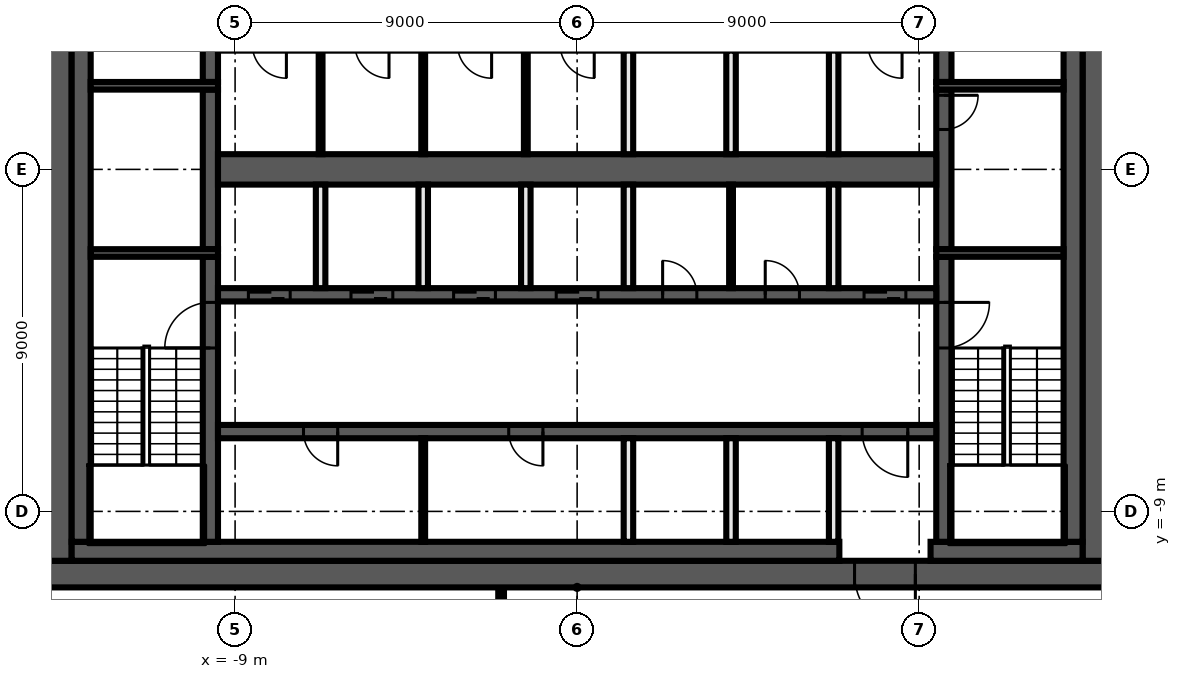
"""IFC4 building model, lengths in metres.
Left out: names, types, materials, properties, quantities, classifications, styles, units other than length and angle.
Written with IfcOpenShell. Run it as: python <this file> out.ifc"""

import sys

from ifc_helpers import new_model, si_unit, direction, frame, frame_2d, origin, place, context, subcontext, project, spatial, rectangle, extrude, element, fill, save


model = new_model("IFC4")
c1 = context("Model", 3, precision=1e-05, world=origin(), true_north=direction((0.0, 1.0)))
c2 = subcontext(c1, "Body", "Model", "MODEL_VIEW")
j1 = project(units=[si_unit("LENGTHUNIT", "METRE"), si_unit("PLANEANGLEUNIT", "RADIAN")], contexts=[c1])
p1 = place(None, origin())
s1 = spatial("IfcSite", under=j1, at=p1, CompositionType="ELEMENT")
p2 = place(p1, origin())
s2 = spatial("IfcBuilding", under=s1, at=p2, CompositionType="ELEMENT")
p3 = place(p2, frame((0.0, 0.0, 228.6)))
s3 = spatial("IfcBuildingStorey", under=s2, at=p3, CompositionType="ELEMENT", Elevation=228.6)
p4 = place(p3, frame((-2.0, -13.325, 0.0), z_axis=(0.0, 0.0, 1.0), x_axis=(0.0, 1.0, 0.0)))
e1 = element("IfcWall", 1, at=p4, inside=s3, PredefinedType="PARTITIONING", context=c2, shape_type="SweptSolid", body=[
    extrude(rectangle(XDim=2.325, YDim=0.15, at=frame_2d((1.163, 0.0))), origin(), (0.0, 0.0, 1.0), 3.75),
])
p5 = place(p3, frame((14.0, -10.65, 0.0), z_axis=(0.0, 0.0, 1.0), x_axis=(-1.0, 0.0, 0.0)))
e2 = element("IfcWall", 2, at=p5, inside=s3, PredefinedType="SHEAR", context=c2, shape_type="SweptSolid", body=[
    extrude(rectangle(XDim=28.0, YDim=0.7, at=frame_2d((14.0, 0.0))), origin(), (0.0, 0.0, 1.0), 3.75),
])
p6 = place(p5, frame((5.1, 0.0, 0.0)))
e3 = element("IfcOpeningElement", 3, at=p6, cuts=e2, PredefinedType="OPENING", context=c2, shape_type="SweptSolid", body=[
    extrude(rectangle(XDim=1.6, YDim=2.1, at=frame_2d((0.8, 1.05))), frame((0.0, 0.36, 0.0), z_axis=(0.0, -1.0, 0.0), x_axis=(1.0, 0.0, 0.0)), (0.0, 0.0, 1.0), 0.72),
])
for number, where, z_axis, x_axis in (
    (4, (13.65, 10.3, 0.0), (0.0, 0.0, 1.0), (0.0, -1.0, 0.0)),
    (5, (-13.65, -10.3, 0.0), (0.0, 0.0, 1.0), (0.0, 1.0, 0.0)),
):
    element("IfcWall", number, at=place(p3, frame(where, z_axis=z_axis, x_axis=x_axis)), inside=s3, PredefinedType="SHEAR", context=c2, shape_type="SweptSolid", body=[
        extrude(rectangle(XDim=20.6, YDim=0.7, at=frame_2d((10.3, 0.0))), origin(), (0.0, 0.0, 1.0), 3.75),
    ])
p7 = place(p3, frame((13.3, -10.05, 0.0), z_axis=(0.0, 0.0, 1.0), x_axis=(-1.0, 0.0, 0.0)))
e6 = element("IfcWall", 6, at=p7, inside=s3, PredefinedType="SHEAR", context=c2, shape_type="SweptSolid", body=[
    extrude(rectangle(XDim=4.0, YDim=0.5, at=frame_2d((2.0, 0.0))), origin(), (0.0, 0.0, 1.0), 3.75),
])
p8 = place(p3, frame((6.9, -10.05, 0.0), z_axis=(0.0, 0.0, 1.0), x_axis=(-1.0, 0.0, 0.0)))
e7 = element("IfcWall", 7, at=p8, inside=s3, PredefinedType="SHEAR", context=c2, shape_type="SweptSolid", body=[
    extrude(rectangle(XDim=20.2, YDim=0.5, at=frame_2d((10.1, 0.0))), origin(), (0.0, 0.0, 1.0), 3.75),
])
for number, where, z_axis, x_axis in (
    (8, (13.05, 9.8, 0.0), (0.0, 0.0, 1.0), (0.0, -1.0, 0.0)),
    (9, (-13.05, -9.8, 0.0), (0.0, 0.0, 1.0), (0.0, 1.0, 0.0)),
):
    element("IfcWall", number, at=place(p3, frame(where, z_axis=z_axis, x_axis=x_axis)), inside=s3, PredefinedType="SHEAR", context=c2, shape_type="SweptSolid", body=[
        extrude(rectangle(XDim=19.6, YDim=0.5, at=frame_2d((9.8, 0.0))), origin(), (0.0, 0.0, 1.0), 3.75),
    ])
p9 = place(p3, frame((9.65, -2.3, 0.0), z_axis=(0.0, 0.0, 1.0), x_axis=(0.0, -1.0, 0.0)))
e10 = element("IfcWall", 10, at=p9, inside=s3, PredefinedType="SHEAR", context=c2, shape_type="SweptSolid", body=[
    extrude(rectangle(XDim=7.5, YDim=0.4, at=frame_2d((3.75, 0.0))), origin(), (0.0, 0.0, 1.0), 3.75),
])
p10 = place(p9, frame((1.2, 0.0, 0.0)))
e11 = element("IfcOpeningElement", 11, at=p10, cuts=e10, PredefinedType="OPENING", context=c2, shape_type="SweptSolid", body=[
    extrude(rectangle(XDim=1.2, YDim=2.1, at=frame_2d((0.6, 1.05))), frame((0.0, 0.21, 0.0), z_axis=(0.0, -1.0, 0.0), x_axis=(1.0, 0.0, 0.0)), (0.0, 0.0, 1.0), 0.42),
])
p11 = place(p3, frame((9.65, 2.1, 0.0), z_axis=(0.0, 0.0, 1.0), x_axis=(0.0, -1.0, 0.0)))
e12 = element("IfcWall", 12, at=p11, inside=s3, PredefinedType="SHEAR", context=c2, shape_type="SweptSolid", body=[
    extrude(rectangle(XDim=4.2, YDim=0.4, at=frame_2d((2.1, 0.0))), origin(), (0.0, 0.0, 1.0), 3.75),
])
p12 = place(p11, frame((0.15, 0.0, 0.0)))
e13 = element("IfcOpeningElement", 13, at=p12, cuts=e12, PredefinedType="OPENING", context=c2, shape_type="SweptSolid", body=[
    extrude(rectangle(XDim=0.9, YDim=2.1, at=frame_2d((0.45, 1.05))), frame((0.0, 0.21, 0.0), z_axis=(0.0, -1.0, 0.0), x_axis=(1.0, 0.0, 0.0)), (0.0, 0.0, 1.0), 0.42),
])
p13 = place(p3, frame((9.65, 9.8, 0.0), z_axis=(0.0, 0.0, 1.0), x_axis=(0.0, -1.0, 0.0)))
e14 = element("IfcWall", 14, at=p13, inside=s3, PredefinedType="SHEAR", context=c2, shape_type="SweptSolid", body=[
    extrude(rectangle(XDim=7.5, YDim=0.4, at=frame_2d((3.75, 0.0))), origin(), (0.0, 0.0, 1.0), 3.75),
])
p14 = place(p13, frame((5.1, 0.0, 0.0)))
e15 = element("IfcOpeningElement", 15, at=p14, cuts=e14, PredefinedType="OPENING", context=c2, shape_type="SweptSolid", body=[
    extrude(rectangle(XDim=1.2, YDim=2.1, at=frame_2d((0.6, 1.05))), frame((0.0, 0.21, 0.0), z_axis=(0.0, -1.0, 0.0), x_axis=(1.0, 0.0, 0.0)), (0.0, 0.0, 1.0), 0.42),
])
p15 = place(p3, frame((-9.65, -9.8, 0.0), z_axis=(0.0, 0.0, 1.0), x_axis=(0.0, 1.0, 0.0)))
e16 = element("IfcWall", 16, at=p15, inside=s3, PredefinedType="SHEAR", context=c2, shape_type="SweptSolid", body=[
    extrude(rectangle(XDim=7.5, YDim=0.4, at=frame_2d((3.75, 0.0))), origin(), (0.0, 0.0, 1.0), 3.75),
])
p16 = place(p15, frame((5.1, 0.0, 0.0)))
e17 = element("IfcOpeningElement", 17, at=p16, cuts=e16, PredefinedType="OPENING", context=c2, shape_type="SweptSolid", body=[
    extrude(rectangle(XDim=1.2, YDim=2.1, at=frame_2d((0.6, 1.05))), frame((0.0, 0.21, 0.0), z_axis=(0.0, -1.0, 0.0), x_axis=(1.0, 0.0, 0.0)), (0.0, 0.0, 1.0), 0.42),
])
p17 = place(p3, frame((-9.65, -2.1, 0.0), z_axis=(0.0, 0.0, 1.0), x_axis=(0.0, 1.0, 0.0)))
e18 = element("IfcWall", 18, at=p17, inside=s3, PredefinedType="SHEAR", context=c2, shape_type="SweptSolid", body=[
    extrude(rectangle(XDim=4.2, YDim=0.4, at=frame_2d((2.1, 0.0))), origin(), (0.0, 0.0, 1.0), 3.75),
])
p18 = place(p3, frame((-9.65, 2.3, 0.0), z_axis=(0.0, 0.0, 1.0), x_axis=(0.0, 1.0, 0.0)))
e19 = element("IfcWall", 19, at=p18, inside=s3, PredefinedType="SHEAR", context=c2, shape_type="SweptSolid", body=[
    extrude(rectangle(XDim=7.5, YDim=0.4, at=frame_2d((3.75, 0.0))), origin(), (0.0, 0.0, 1.0), 3.75),
])
p19 = place(p18, frame((1.2, 0.0, 0.0)))
e20 = element("IfcOpeningElement", 20, at=p19, cuts=e19, PredefinedType="OPENING", context=c2, shape_type="SweptSolid", body=[
    extrude(rectangle(XDim=1.2, YDim=2.1, at=frame_2d((0.6, 1.05))), frame((0.0, 0.21, 0.0), z_axis=(0.0, -1.0, 0.0), x_axis=(1.0, 0.0, 0.0)), (0.0, 0.0, 1.0), 0.42),
])
for number, where, z_axis, x_axis in (
    (21, (9.45, 2.2, 0.0), (0.0, 0.0, 1.0), (1.0, 0.0, 0.0)),
    (22, (-9.45, 2.2, 0.0), (0.0, 0.0, 1.0), (-1.0, 0.0, 0.0)),
    (23, (9.45, -2.2, 0.0), (0.0, 0.0, 1.0), (1.0, 0.0, 0.0)),
    (24, (-9.45, -2.2, 0.0), (0.0, 0.0, 1.0), (-1.0, 0.0, 0.0)),
):
    element("IfcWall", number, at=place(p3, frame(where, z_axis=z_axis, x_axis=x_axis)), inside=s3, PredefinedType="SHEAR", context=c2, shape_type="SweptSolid", body=[
        extrude(rectangle(XDim=3.35, YDim=0.2, at=frame_2d((1.675, 0.0))), origin(), (0.0, 0.0, 1.0), 3.75),
    ])
p20 = place(p3, frame((-9.45, -3.3, 0.0), z_axis=(0.0, 0.0, 1.0), x_axis=(1.0, 0.0, 0.0)))
e25 = element("IfcWall", 25, at=p20, inside=s3, PredefinedType="SHEAR", context=c2, shape_type="SweptSolid", body=[
    extrude(rectangle(XDim=18.9, YDim=0.35, at=frame_2d((9.45, 0.0))), origin(), (0.0, 0.0, 1.0), 3.75),
])
p21 = place(p20, frame((0.8, 0.0, 0.0)))
e26 = element("IfcOpeningElement", 26, at=p21, cuts=e25, PredefinedType="OPENING", context=c2, shape_type="SweptSolid", body=[
    extrude(rectangle(XDim=1.1, YDim=2.1, at=frame_2d((0.55, 1.05))), frame((0.0, 0.185, 0.0), z_axis=(0.0, -1.0, 0.0), x_axis=(1.0, 0.0, 0.0)), (0.0, 0.0, 1.0), 0.37),
])
p22 = place(p20, frame((3.5, 0.0, 0.0)))
e27 = element("IfcOpeningElement", 27, at=p22, cuts=e25, PredefinedType="OPENING", context=c2, shape_type="SweptSolid", body=[
    extrude(rectangle(XDim=1.1, YDim=2.1, at=frame_2d((0.55, 1.05))), frame((0.0, 0.185, 0.0), z_axis=(0.0, -1.0, 0.0), x_axis=(1.0, 0.0, 0.0)), (0.0, 0.0, 1.0), 0.37),
])
p23 = place(p20, frame((6.2, 0.0, 0.0)))
e28 = element("IfcOpeningElement", 28, at=p23, cuts=e25, PredefinedType="OPENING", context=c2, shape_type="SweptSolid", body=[
    extrude(rectangle(XDim=1.1, YDim=2.1, at=frame_2d((0.55, 1.05))), frame((0.0, 0.185, 0.0), z_axis=(0.0, -1.0, 0.0), x_axis=(1.0, 0.0, 0.0)), (0.0, 0.0, 1.0), 0.37),
])
p24 = place(p20, frame((8.9, 0.0, 0.0)))
e29 = element("IfcOpeningElement", 29, at=p24, cuts=e25, PredefinedType="OPENING", context=c2, shape_type="SweptSolid", body=[
    extrude(rectangle(XDim=1.1, YDim=2.1, at=frame_2d((0.55, 1.05))), frame((0.0, 0.185, 0.0), z_axis=(0.0, -1.0, 0.0), x_axis=(1.0, 0.0, 0.0)), (0.0, 0.0, 1.0), 0.37),
])
p25 = place(p20, frame((17.0, 0.0, 0.0)))
e30 = element("IfcOpeningElement", 30, at=p25, cuts=e25, PredefinedType="OPENING", context=c2, shape_type="SweptSolid", body=[
    extrude(rectangle(XDim=1.1, YDim=2.1, at=frame_2d((0.55, 1.05))), frame((0.0, 0.185, 0.0), z_axis=(0.0, -1.0, 0.0), x_axis=(1.0, 0.0, 0.0)), (0.0, 0.0, 1.0), 0.37),
])
p26 = place(p20, frame((11.7, 0.0, 0.0)))
e31 = element("IfcOpeningElement", 31, at=p26, cuts=e25, PredefinedType="OPENING", context=c2, shape_type="SweptSolid", body=[
    extrude(rectangle(XDim=0.9, YDim=2.1, at=frame_2d((0.45, 1.05))), frame((0.0, 0.185, 0.0), z_axis=(0.0, -1.0, 0.0), x_axis=(1.0, 0.0, 0.0)), (0.0, 0.0, 1.0), 0.37),
])
p27 = place(p20, frame((14.4, 0.0, 0.0)))
e32 = element("IfcOpeningElement", 32, at=p27, cuts=e25, PredefinedType="OPENING", context=c2, shape_type="SweptSolid", body=[
    extrude(rectangle(XDim=0.9, YDim=2.1, at=frame_2d((0.45, 1.05))), frame((0.0, 0.185, 0.0), z_axis=(0.0, -1.0, 0.0), x_axis=(1.0, 0.0, 0.0)), (0.0, 0.0, 1.0), 0.37),
])
p28 = place(p3, frame((9.45, -6.9, 0.0), z_axis=(0.0, 0.0, 1.0), x_axis=(-1.0, 0.0, 0.0)))
e33 = element("IfcWall", 33, at=p28, inside=s3, PredefinedType="SHEAR", context=c2, shape_type="SweptSolid", body=[
    extrude(rectangle(XDim=18.9, YDim=0.35, at=frame_2d((9.45, 0.0))), origin(), (0.0, 0.0, 1.0), 3.75),
])
p29 = place(p28, frame((0.75, 0.0, 0.0)))
e34 = element("IfcOpeningElement", 34, at=p29, cuts=e33, PredefinedType="OPENING", context=c2, shape_type="SweptSolid", body=[
    extrude(rectangle(XDim=1.2, YDim=2.1, at=frame_2d((0.6, 1.05))), frame((0.0, 0.185, 0.0), z_axis=(0.0, -1.0, 0.0), x_axis=(1.0, 0.0, 0.0)), (0.0, 0.0, 1.0), 0.37),
])
p30 = place(p28, frame((15.75, 0.0, 0.0)))
e35 = element("IfcOpeningElement", 35, at=p30, cuts=e33, PredefinedType="OPENING", context=c2, shape_type="SweptSolid", body=[
    extrude(rectangle(XDim=0.9, YDim=2.1, at=frame_2d((0.45, 1.05))), frame((0.0, 0.185, 0.0), z_axis=(0.0, -1.0, 0.0), x_axis=(1.0, 0.0, 0.0)), (0.0, 0.0, 1.0), 0.37),
])
p31 = place(p28, frame((10.35, 0.0, 0.0)))
e36 = element("IfcOpeningElement", 36, at=p31, cuts=e33, PredefinedType="OPENING", context=c2, shape_type="SweptSolid", body=[
    extrude(rectangle(XDim=0.9, YDim=2.1, at=frame_2d((0.45, 1.05))), frame((0.0, 0.185, 0.0), z_axis=(0.0, -1.0, 0.0), x_axis=(1.0, 0.0, 0.0)), (0.0, 0.0, 1.0), 0.37),
])
p32 = place(p3, frame((-9.45, 0.0, 0.0), z_axis=(0.0, 0.0, 1.0), x_axis=(1.0, 0.0, 0.0)))
e37 = element("IfcWall", 37, at=p32, inside=s3, PredefinedType="SHEAR", context=c2, shape_type="SweptSolid", body=[
    extrude(rectangle(XDim=18.9, YDim=0.8, at=frame_2d((9.45, 0.0))), origin(), (0.0, 0.0, 1.0), 3.75),
])
for number, where, z_axis, x_axis in (
    (38, (6.75, -9.8, 0.0), (0.0, 0.0, 1.0), (0.0, 1.0, 0.0)),
    (39, (6.75, -3.125, 0.0), (0.0, 0.0, 1.0), (0.0, 1.0, 0.0)),
    (40, (6.75, 0.4, 0.0), (0.0, 0.0, 1.0), (0.0, 1.0, 0.0)),
):
    element("IfcWall", number, at=place(p3, frame(where, z_axis=z_axis, x_axis=x_axis)), inside=s3, PredefinedType="SOLIDWALL", context=c2, shape_type="SweptSolid", body=[
        extrude(rectangle(XDim=2.725, YDim=0.25, at=frame_2d((1.363, 0.0))), origin(), (0.0, 0.0, 1.0), 3.75),
    ])
p33 = place(p3, frame((4.05, -3.125, 0.0), z_axis=(0.0, 0.0, 1.0), x_axis=(0.0, 1.0, 0.0)))
e41 = element("IfcWall", 41, at=p33, inside=s3, PredefinedType="PARTITIONING", context=c2, shape_type="SweptSolid", body=[
    extrude(rectangle(XDim=2.725, YDim=0.1, at=frame_2d((1.363, 0.0))), origin(), (0.0, 0.0, 1.0), 3.75),
])
for number, where, z_axis, x_axis in (
    (42, (4.05, -9.8, 0.0), (0.0, 0.0, 1.0), (0.0, 1.0, 0.0)),
    (43, (4.05, 0.4, 0.0), (0.0, 0.0, 1.0), (0.0, 1.0, 0.0)),
    (44, (1.35, -9.8, 0.0), (0.0, 0.0, 1.0), (0.0, 1.0, 0.0)),
    (45, (1.35, -3.125, 0.0), (0.0, 0.0, 1.0), (0.0, 1.0, 0.0)),
    (46, (1.35, 0.4, 0.0), (0.0, 0.0, 1.0), (0.0, 1.0, 0.0)),
):
    element("IfcWall", number, at=place(p3, frame(where, z_axis=z_axis, x_axis=x_axis)), inside=s3, PredefinedType="SOLIDWALL", context=c2, shape_type="SweptSolid", body=[
        extrude(rectangle(XDim=2.725, YDim=0.25, at=frame_2d((1.363, 0.0))), origin(), (0.0, 0.0, 1.0), 3.75),
    ])
p34 = place(p3, frame((-1.35, 0.4, 0.0), z_axis=(0.0, 0.0, 1.0), x_axis=(0.0, 1.0, 0.0)))
e47 = element("IfcWall", 47, at=p34, inside=s3, PredefinedType="PARTITIONING", context=c2, shape_type="SweptSolid", body=[
    extrude(rectangle(XDim=2.725, YDim=0.1, at=frame_2d((1.363, 0.0))), origin(), (0.0, 0.0, 1.0), 3.75),
])
p35 = place(p3, frame((-1.35, -3.125, 0.0), z_axis=(0.0, 0.0, 1.0), x_axis=(0.0, 1.0, 0.0)))
e48 = element("IfcWall", 48, at=p35, inside=s3, PredefinedType="SOLIDWALL", context=c2, shape_type="SweptSolid", body=[
    extrude(rectangle(XDim=2.725, YDim=0.25, at=frame_2d((1.363, 0.0))), origin(), (0.0, 0.0, 1.0), 3.75),
])
for number, where, z_axis, x_axis in (
    (49, (-4.05, -9.8, 0.0), (0.0, 0.0, 1.0), (0.0, 1.0, 0.0)),
    (50, (-4.05, 0.4, 0.0), (0.0, 0.0, 1.0), (0.0, 1.0, 0.0)),
):
    element("IfcWall", number, at=place(p3, frame(where, z_axis=z_axis, x_axis=x_axis)), inside=s3, PredefinedType="PARTITIONING", context=c2, shape_type="SweptSolid", body=[
        extrude(rectangle(XDim=2.725, YDim=0.1, at=frame_2d((1.363, 0.0))), origin(), (0.0, 0.0, 1.0), 3.75),
    ])
p36 = place(p3, frame((-4.05, -3.125, 0.0), z_axis=(0.0, 0.0, 1.0), x_axis=(0.0, 1.0, 0.0)))
e51 = element("IfcWall", 51, at=p36, inside=s3, PredefinedType="SOLIDWALL", context=c2, shape_type="SweptSolid", body=[
    extrude(rectangle(XDim=2.725, YDim=0.25, at=frame_2d((1.363, 0.0))), origin(), (0.0, 0.0, 1.0), 3.75),
])
p37 = place(p3, frame((-6.75, 0.4, 0.0), z_axis=(0.0, 0.0, 1.0), x_axis=(0.0, 1.0, 0.0)))
e52 = element("IfcWall", 52, at=p37, inside=s3, PredefinedType="PARTITIONING", context=c2, shape_type="SweptSolid", body=[
    extrude(rectangle(XDim=2.725, YDim=0.1, at=frame_2d((1.363, 0.0))), origin(), (0.0, 0.0, 1.0), 3.75),
])
p38 = place(p3, frame((-6.75, -3.125, 0.0), z_axis=(0.0, 0.0, 1.0), x_axis=(0.0, 1.0, 0.0)))
e53 = element("IfcWall", 53, at=p38, inside=s3, PredefinedType="SOLIDWALL", context=c2, shape_type="SweptSolid", body=[
    extrude(rectangle(XDim=2.725, YDim=0.25, at=frame_2d((1.363, 0.0))), origin(), (0.0, 0.0, 1.0), 3.75),
])
p39 = place(p12, origin())
e54 = element("IfcDoor", 54, at=p39, inside=s3, OperationType="SINGLE_SWING_RIGHT", PredefinedType="DOOR", context=c2, shape_type="SweptSolid", body=[
    extrude(rectangle(XDim=0.9, YDim=2.1, at=frame_2d((0.45, 1.05))), frame((0.0, 0.025, 0.0), z_axis=(0.0, -1.0, 0.0), x_axis=(1.0, 0.0, 0.0)), (0.0, 0.0, 1.0), 0.05),
])
fill(e13, e54)
p40 = place(p21, origin())
e55 = element("IfcDoor", 55, at=p40, inside=s3, OperationType="DOUBLE_DOOR_SLIDING", PredefinedType="DOOR", context=c2, shape_type="SweptSolid", body=[
    extrude(rectangle(XDim=1.1, YDim=2.1, at=frame_2d((0.55, 1.05))), frame((0.0, 0.025, 0.0), z_axis=(0.0, -1.0, 0.0), x_axis=(1.0, 0.0, 0.0)), (0.0, 0.0, 1.0), 0.05),
])
fill(e26, e55)
p41 = place(p22, origin())
e56 = element("IfcDoor", 56, at=p41, inside=s3, OperationType="DOUBLE_DOOR_SLIDING", PredefinedType="DOOR", context=c2, shape_type="SweptSolid", body=[
    extrude(rectangle(XDim=1.1, YDim=2.1, at=frame_2d((0.55, 1.05))), frame((0.0, 0.025, 0.0), z_axis=(0.0, -1.0, 0.0), x_axis=(1.0, 0.0, 0.0)), (0.0, 0.0, 1.0), 0.05),
])
fill(e27, e56)
p42 = place(p23, origin())
e57 = element("IfcDoor", 57, at=p42, inside=s3, OperationType="DOUBLE_DOOR_SLIDING", PredefinedType="DOOR", context=c2, shape_type="SweptSolid", body=[
    extrude(rectangle(XDim=1.1, YDim=2.1, at=frame_2d((0.55, 1.05))), frame((0.0, 0.025, 0.0), z_axis=(0.0, -1.0, 0.0), x_axis=(1.0, 0.0, 0.0)), (0.0, 0.0, 1.0), 0.05),
])
fill(e28, e57)
p43 = place(p24, origin())
e58 = element("IfcDoor", 58, at=p43, inside=s3, OperationType="DOUBLE_DOOR_SLIDING", PredefinedType="DOOR", context=c2, shape_type="SweptSolid", body=[
    extrude(rectangle(XDim=1.1, YDim=2.1, at=frame_2d((0.55, 1.05))), frame((0.0, 0.025, 0.0), z_axis=(0.0, -1.0, 0.0), x_axis=(1.0, 0.0, 0.0)), (0.0, 0.0, 1.0), 0.05),
])
fill(e29, e58)
p44 = place(p25, origin())
e59 = element("IfcDoor", 59, at=p44, inside=s3, OperationType="DOUBLE_DOOR_SLIDING", PredefinedType="DOOR", context=c2, shape_type="SweptSolid", body=[
    extrude(rectangle(XDim=1.1, YDim=2.1, at=frame_2d((0.55, 1.05))), frame((0.0, 0.025, 0.0), z_axis=(0.0, -1.0, 0.0), x_axis=(1.0, 0.0, 0.0)), (0.0, 0.0, 1.0), 0.05),
])
fill(e30, e59)
p45 = place(p6, origin())
e60 = element("IfcDoor", 60, at=p45, inside=s3, OperationType="DOUBLE_DOOR_SINGLE_SWING", PredefinedType="DOOR", context=c2, shape_type="SweptSolid", body=[
    extrude(rectangle(XDim=1.6, YDim=2.1, at=frame_2d((0.8, 1.05))), frame((0.0, 0.025, 0.0), z_axis=(0.0, -1.0, 0.0), x_axis=(1.0, 0.0, 0.0)), (0.0, 0.0, 1.0), 0.05),
])
fill(e3, e60)
p46 = place(p29, origin())
e61 = element("IfcDoor", 61, at=p46, inside=s3, OperationType="SINGLE_SWING_LEFT", PredefinedType="DOOR", context=c2, shape_type="SweptSolid", body=[
    extrude(rectangle(XDim=1.2, YDim=2.1, at=frame_2d((0.6, 1.05))), frame((0.0, 0.025, 0.0), z_axis=(0.0, -1.0, 0.0), x_axis=(1.0, 0.0, 0.0)), (0.0, 0.0, 1.0), 0.05),
])
fill(e34, e61)
p47 = place(p26, origin())
e62 = element("IfcDoor", 62, at=p47, inside=s3, OperationType="SINGLE_SWING_RIGHT", PredefinedType="DOOR", context=c2, shape_type="SweptSolid", body=[
    extrude(rectangle(XDim=0.9, YDim=2.1, at=frame_2d((0.45, 1.05))), frame((0.0, 0.025, 0.0), z_axis=(0.0, -1.0, 0.0), x_axis=(1.0, 0.0, 0.0)), (0.0, 0.0, 1.0), 0.05),
])
fill(e31, e62)
p48 = place(p27, origin())
e63 = element("IfcDoor", 63, at=p48, inside=s3, OperationType="SINGLE_SWING_LEFT", PredefinedType="DOOR", context=c2, shape_type="SweptSolid", body=[
    extrude(rectangle(XDim=0.9, YDim=2.1, at=frame_2d((0.45, 1.05))), frame((0.0, 0.025, 0.0), z_axis=(0.0, -1.0, 0.0), x_axis=(1.0, 0.0, 0.0)), (0.0, 0.0, 1.0), 0.05),
])
fill(e32, e63)
p49 = place(p30, origin())
e64 = element("IfcDoor", 64, at=p49, inside=s3, OperationType="SINGLE_SWING_RIGHT", PredefinedType="DOOR", context=c2, shape_type="SweptSolid", body=[
    extrude(rectangle(XDim=0.9, YDim=2.1, at=frame_2d((0.45, 1.05))), frame((0.0, 0.025, 0.0), z_axis=(0.0, -1.0, 0.0), x_axis=(1.0, 0.0, 0.0)), (0.0, 0.0, 1.0), 0.05),
])
fill(e35, e64)
p50 = place(p31, origin())
e65 = element("IfcDoor", 65, at=p50, inside=s3, OperationType="SINGLE_SWING_LEFT", PredefinedType="DOOR", context=c2, shape_type="SweptSolid", body=[
    extrude(rectangle(XDim=0.9, YDim=2.1, at=frame_2d((0.45, 1.05))), frame((0.0, 0.025, 0.0), z_axis=(0.0, -1.0, 0.0), x_axis=(1.0, 0.0, 0.0)), (0.0, 0.0, 1.0), 0.05),
])
fill(e36, e65)
p51 = place(p10, origin())
e66 = element("IfcDoor", 66, at=p51, inside=s3, OperationType="SINGLE_SWING_RIGHT", PredefinedType="DOOR", context=c2, shape_type="SweptSolid", body=[
    extrude(rectangle(XDim=1.2, YDim=2.1, at=frame_2d((0.6, 1.05))), frame((0.0, 0.025, 0.0), z_axis=(0.0, -1.0, 0.0), x_axis=(1.0, 0.0, 0.0)), (0.0, 0.0, 1.0), 0.05),
])
fill(e11, e66)
p52 = place(p16, origin())
e67 = element("IfcDoor", 67, at=p52, inside=s3, OperationType="SINGLE_SWING_LEFT", PredefinedType="DOOR", context=c2, shape_type="SweptSolid", body=[
    extrude(rectangle(XDim=1.2, YDim=2.1, at=frame_2d((0.6, 1.05))), frame((0.0, 0.025, 0.0), z_axis=(0.0, -1.0, 0.0), x_axis=(1.0, 0.0, 0.0)), (0.0, 0.0, 1.0), 0.05),
])
fill(e17, e67)
save(model, sys.argv[1])
